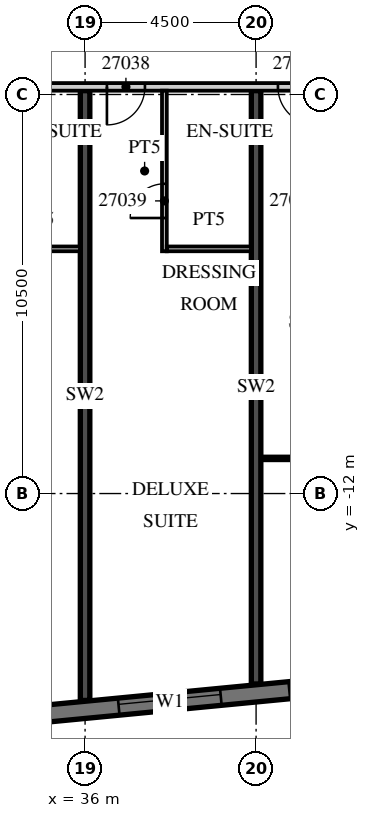
"""IFC4 building model, lengths in metres.
Left out: names, types, materials, properties, quantities, classifications, styles, units other than length and angle.
Written with IfcOpenShell. Run it as: python <this file> out.ifc"""

import sys

from ifc_helpers import new_model, si_unit, direction, frame, frame_2d, origin, place, context, subcontext, project, spatial, rectangle, extrude, element, fill, save


model = new_model("IFC4")
c1 = context("Model", 3, precision=1e-05, world=origin(), true_north=direction((0.0, 1.0)))
c2 = subcontext(c1, "Body", "Model", "MODEL_VIEW")
j1 = project(units=[si_unit("LENGTHUNIT", "METRE"), si_unit("PLANEANGLEUNIT", "RADIAN")], contexts=[c1])
p1 = place(None, origin())
s1 = spatial("IfcSite", under=j1, at=p1, CompositionType="ELEMENT")
p2 = place(p1, origin())
s2 = spatial("IfcBuilding", under=s1, at=p2, CompositionType="ELEMENT")
p3 = place(p2, frame((0.0, 0.0, 124.0)))
s3 = spatial("IfcBuildingStorey", under=s2, at=p3, CompositionType="ELEMENT", Elevation=124.0)
p4 = place(p3, frame((36.0, -17.444, 0.0), z_axis=(0.0, 0.0, 1.0), x_axis=(0.0, 1.0, 0.0)))
e1 = element("IfcWall", 1, at=p4, inside=s3, PredefinedType="SHEAR", context=c2, shape_type="SweptSolid", body=[
    extrude(rectangle(XDim=16.044, YDim=0.25, at=frame_2d((8.022, 0.0))), origin(), (0.0, 0.0, 1.0), 3.3),
])
p5 = place(p3, frame((40.5, -17.011, 0.0), z_axis=(0.0, 0.0, 1.0), x_axis=(0.0, 1.0, 0.0)))
e2 = element("IfcWall", 2, at=p5, inside=s3, PredefinedType="SHEAR", context=c2, shape_type="SweptSolid", body=[
    extrude(rectangle(XDim=15.611, YDim=0.25, at=frame_2d((7.805, 0.0))), origin(), (0.0, 0.0, 1.0), 3.3),
])
p6 = place(p3, frame((-13.521, -22.46, 0.0), z_axis=(0.0, 0.0, 1.0), x_axis=(0.995396096335, 0.095846812164, 0.0)))
e3 = element("IfcWall", 3, at=p6, inside=s3, PredefinedType="SOLIDWALL", context=c2, shape_type="SweptSolid", body=[
    extrude(rectangle(XDim=59.151, YDim=0.45, at=frame_2d((29.575, 0.0))), origin(), (0.0, 0.0, 1.0), 3.02),
])
p7 = place(p6, frame((0.91, 0.0, 0.45)))
e4 = element("IfcOpeningElement", 4, at=p7, cuts=e3, PredefinedType="OPENING", context=c2, shape_type="SweptSolid", body=[
    extrude(rectangle(XDim=2.7, YDim=2.25, at=frame_2d((1.35, 1.125))), frame((0.0, 0.235, 0.0), z_axis=(0.0, -1.0, 0.0), x_axis=(1.0, 0.0, 0.0)), (0.0, 0.0, 1.0), 0.47),
])
p8 = place(p6, frame((5.431, 0.0, 0.45)))
e5 = element("IfcOpeningElement", 5, at=p8, cuts=e3, PredefinedType="OPENING", context=c2, shape_type="SweptSolid", body=[
    extrude(rectangle(XDim=2.7, YDim=2.25, at=frame_2d((1.35, 1.125))), frame((0.0, 0.235, 0.0), z_axis=(0.0, -1.0, 0.0), x_axis=(1.0, 0.0, 0.0)), (0.0, 0.0, 1.0), 0.47),
])
p9 = place(p6, frame((9.952, 0.0, 0.45)))
e6 = element("IfcOpeningElement", 6, at=p9, cuts=e3, PredefinedType="OPENING", context=c2, shape_type="SweptSolid", body=[
    extrude(rectangle(XDim=2.7, YDim=2.25, at=frame_2d((1.35, 1.125))), frame((0.0, 0.235, 0.0), z_axis=(0.0, -1.0, 0.0), x_axis=(1.0, 0.0, 0.0)), (0.0, 0.0, 1.0), 0.47),
])
p10 = place(p6, frame((14.473, 0.0, 0.45)))
e7 = element("IfcOpeningElement", 7, at=p10, cuts=e3, PredefinedType="OPENING", context=c2, shape_type="SweptSolid", body=[
    extrude(rectangle(XDim=2.7, YDim=2.25, at=frame_2d((1.35, 1.125))), frame((0.0, 0.235, 0.0), z_axis=(0.0, -1.0, 0.0), x_axis=(1.0, 0.0, 0.0)), (0.0, 0.0, 1.0), 0.47),
])
p11 = place(p6, frame((18.994, 0.0, 0.45)))
e8 = element("IfcOpeningElement", 8, at=p11, cuts=e3, PredefinedType="OPENING", context=c2, shape_type="SweptSolid", body=[
    extrude(rectangle(XDim=2.7, YDim=2.25, at=frame_2d((1.35, 1.125))), frame((0.0, 0.235, 0.0), z_axis=(0.0, -1.0, 0.0), x_axis=(1.0, 0.0, 0.0)), (0.0, 0.0, 1.0), 0.47),
])
p12 = place(p6, frame((23.514, 0.0, 0.45)))
e9 = element("IfcOpeningElement", 9, at=p12, cuts=e3, PredefinedType="OPENING", context=c2, shape_type="SweptSolid", body=[
    extrude(rectangle(XDim=2.7, YDim=2.25, at=frame_2d((1.35, 1.125))), frame((0.0, 0.235, 0.0), z_axis=(0.0, -1.0, 0.0), x_axis=(1.0, 0.0, 0.0)), (0.0, 0.0, 1.0), 0.47),
])
p13 = place(p6, frame((28.035, 0.0, 0.45)))
e10 = element("IfcOpeningElement", 10, at=p13, cuts=e3, PredefinedType="OPENING", context=c2, shape_type="SweptSolid", body=[
    extrude(rectangle(XDim=2.7, YDim=2.25, at=frame_2d((1.35, 1.125))), frame((0.0, 0.235, 0.0), z_axis=(0.0, -1.0, 0.0), x_axis=(1.0, 0.0, 0.0)), (0.0, 0.0, 1.0), 0.47),
])
p14 = place(p6, frame((32.556, 0.0, 0.45)))
e11 = element("IfcOpeningElement", 11, at=p14, cuts=e3, PredefinedType="OPENING", context=c2, shape_type="SweptSolid", body=[
    extrude(rectangle(XDim=2.7, YDim=2.25, at=frame_2d((1.35, 1.125))), frame((0.0, 0.235, 0.0), z_axis=(0.0, -1.0, 0.0), x_axis=(1.0, 0.0, 0.0)), (0.0, 0.0, 1.0), 0.47),
])
p15 = place(p6, frame((37.077, 0.0, 0.45)))
e12 = element("IfcOpeningElement", 12, at=p15, cuts=e3, PredefinedType="OPENING", context=c2, shape_type="SweptSolid", body=[
    extrude(rectangle(XDim=2.7, YDim=2.25, at=frame_2d((1.35, 1.125))), frame((0.0, 0.235, 0.0), z_axis=(0.0, -1.0, 0.0), x_axis=(1.0, 0.0, 0.0)), (0.0, 0.0, 1.0), 0.47),
])
p16 = place(p6, frame((41.598, 0.0, 0.45)))
e13 = element("IfcOpeningElement", 13, at=p16, cuts=e3, PredefinedType="OPENING", context=c2, shape_type="SweptSolid", body=[
    extrude(rectangle(XDim=2.7, YDim=2.25, at=frame_2d((1.35, 1.125))), frame((0.0, 0.235, 0.0), z_axis=(0.0, -1.0, 0.0), x_axis=(1.0, 0.0, 0.0)), (0.0, 0.0, 1.0), 0.47),
])
p17 = place(p6, frame((46.118, 0.0, 0.45)))
e14 = element("IfcOpeningElement", 14, at=p17, cuts=e3, PredefinedType="OPENING", context=c2, shape_type="SweptSolid", body=[
    extrude(rectangle(XDim=2.7, YDim=2.25, at=frame_2d((1.35, 1.125))), frame((0.0, 0.235, 0.0), z_axis=(0.0, -1.0, 0.0), x_axis=(1.0, 0.0, 0.0)), (0.0, 0.0, 1.0), 0.47),
])
p18 = place(p6, frame((50.639, 0.0, 0.45)))
e15 = element("IfcOpeningElement", 15, at=p18, cuts=e3, PredefinedType="OPENING", context=c2, shape_type="SweptSolid", body=[
    extrude(rectangle(XDim=2.7, YDim=2.25, at=frame_2d((1.35, 1.125))), frame((0.0, 0.235, 0.0), z_axis=(0.0, -1.0, 0.0), x_axis=(1.0, 0.0, 0.0)), (0.0, 0.0, 1.0), 0.47),
])
p19 = place(p6, frame((55.15, 0.0, 0.45)))
e16 = element("IfcOpeningElement", 16, at=p19, cuts=e3, PredefinedType="OPENING", context=c2, shape_type="SweptSolid", body=[
    extrude(rectangle(XDim=2.7, YDim=2.25, at=frame_2d((1.35, 1.125))), frame((0.0, 0.235, 0.0), z_axis=(0.0, -1.0, 0.0), x_axis=(1.0, 0.0, 0.0)), (0.0, 0.0, 1.0), 0.47),
])
p20 = place(p3, frame((-13.5, -1.3, 0.0), z_axis=(0.0, 0.0, 1.0), x_axis=(1.0, 0.0, 0.0)))
e17 = element("IfcWall", 17, at=p20, inside=s3, PredefinedType="PARTITIONING", context=c2, shape_type="SweptSolid", body=[
    extrude(rectangle(XDim=60.932, YDim=0.2, at=frame_2d((30.466, 0.0))), origin(), (0.0, 0.0, 1.0), 3.02),
])
p21 = place(p20, frame((2.925, 0.0, 0.0)))
e18 = element("IfcOpeningElement", 18, at=p21, cuts=e17, PredefinedType="OPENING", context=c2, shape_type="SweptSolid", body=[
    extrude(rectangle(XDim=1.0, YDim=2.1, at=frame_2d((0.5, 1.05))), frame((0.0, 0.11, 0.0), z_axis=(0.0, -1.0, 0.0), x_axis=(1.0, 0.0, 0.0)), (0.0, 0.0, 1.0), 0.22),
])
p22 = place(p20, frame((9.863, 0.0, 0.0)))
e19 = element("IfcOpeningElement", 19, at=p22, cuts=e17, PredefinedType="OPENING", context=c2, shape_type="SweptSolid", body=[
    extrude(rectangle(XDim=1.2, YDim=2.1, at=frame_2d((0.6, 1.05))), frame((0.0, 0.11, 0.0), z_axis=(0.0, -1.0, 0.0), x_axis=(1.0, 0.0, 0.0)), (0.0, 0.0, 1.0), 0.22),
])
p23 = place(p20, frame((15.938, 0.0, 0.0)))
e20 = element("IfcOpeningElement", 20, at=p23, cuts=e17, PredefinedType="OPENING", context=c2, shape_type="SweptSolid", body=[
    extrude(rectangle(XDim=1.2, YDim=2.1, at=frame_2d((0.6, 1.05))), frame((0.0, 0.11, 0.0), z_axis=(0.0, -1.0, 0.0), x_axis=(1.0, 0.0, 0.0)), (0.0, 0.0, 1.0), 0.22),
])
p24 = place(p20, frame((27.862, 0.0, 0.0)))
e21 = element("IfcOpeningElement", 21, at=p24, cuts=e17, PredefinedType="OPENING", context=c2, shape_type="SweptSolid", body=[
    extrude(rectangle(XDim=1.2, YDim=2.1, at=frame_2d((0.6, 1.05))), frame((0.0, 0.11, 0.0), z_axis=(0.0, -1.0, 0.0), x_axis=(1.0, 0.0, 0.0)), (0.0, 0.0, 1.0), 0.22),
])
p25 = place(p20, frame((34.45, 0.0, 0.0)))
e22 = element("IfcOpeningElement", 22, at=p25, cuts=e17, PredefinedType="OPENING", context=c2, shape_type="SweptSolid", body=[
    extrude(rectangle(XDim=1.0, YDim=2.1, at=frame_2d((0.5, 1.05))), frame((0.0, 0.11, 0.0), z_axis=(0.0, -1.0, 0.0), x_axis=(1.0, 0.0, 0.0)), (0.0, 0.0, 1.0), 0.22),
])
p26 = place(p20, frame((36.55, 0.0, 0.0)))
e23 = element("IfcOpeningElement", 23, at=p26, cuts=e17, PredefinedType="OPENING", context=c2, shape_type="SweptSolid", body=[
    extrude(rectangle(XDim=1.0, YDim=2.1, at=frame_2d((0.5, 1.05))), frame((0.0, 0.11, 0.0), z_axis=(0.0, -1.0, 0.0), x_axis=(1.0, 0.0, 0.0)), (0.0, 0.0, 1.0), 0.22),
])
p27 = place(p20, frame((41.075, 0.0, 0.0)))
e24 = element("IfcOpeningElement", 24, at=p27, cuts=e17, PredefinedType="OPENING", context=c2, shape_type="SweptSolid", body=[
    extrude(rectangle(XDim=1.0, YDim=2.1, at=frame_2d((0.5, 1.05))), frame((0.0, 0.11, 0.0), z_axis=(0.0, -1.0, 0.0), x_axis=(1.0, 0.0, 0.0)), (0.0, 0.0, 1.0), 0.22),
])
p28 = place(p20, frame((45.55, 0.0, 0.0)))
e25 = element("IfcOpeningElement", 25, at=p28, cuts=e17, PredefinedType="OPENING", context=c2, shape_type="SweptSolid", body=[
    extrude(rectangle(XDim=1.0, YDim=2.1, at=frame_2d((0.5, 1.05))), frame((0.0, 0.11, 0.0), z_axis=(0.0, -1.0, 0.0), x_axis=(1.0, 0.0, 0.0)), (0.0, 0.0, 1.0), 0.22),
])
p29 = place(p20, frame((50.075, 0.0, 0.0)))
e26 = element("IfcOpeningElement", 26, at=p29, cuts=e17, PredefinedType="OPENING", context=c2, shape_type="SweptSolid", body=[
    extrude(rectangle(XDim=1.0, YDim=2.1, at=frame_2d((0.5, 1.05))), frame((0.0, 0.11, 0.0), z_axis=(0.0, -1.0, 0.0), x_axis=(1.0, 0.0, 0.0)), (0.0, 0.0, 1.0), 0.22),
])
p30 = place(p20, frame((54.575, 0.0, 0.0)))
e27 = element("IfcOpeningElement", 27, at=p30, cuts=e17, PredefinedType="OPENING", context=c2, shape_type="SweptSolid", body=[
    extrude(rectangle(XDim=1.0, YDim=2.1, at=frame_2d((0.5, 1.05))), frame((0.0, 0.11, 0.0), z_axis=(0.0, -1.0, 0.0), x_axis=(1.0, 0.0, 0.0)), (0.0, 0.0, 1.0), 0.22),
])
p31 = place(p20, frame((59.882, 0.0, 0.0)))
e28 = element("IfcOpeningElement", 28, at=p31, cuts=e17, PredefinedType="OPENING", context=c2, shape_type="SweptSolid", body=[
    extrude(rectangle(XDim=0.9, YDim=2.1, at=frame_2d((0.45, 1.05))), frame((0.0, 0.11, 0.0), z_axis=(0.0, -1.0, 0.0), x_axis=(1.0, 0.0, 0.0)), (0.0, 0.0, 1.0), 0.22),
])
p32 = place(p3, frame((33.625, -5.562, 0.0), z_axis=(0.0, 0.0, 1.0), x_axis=(1.0, 0.0, 0.0)))
e29 = element("IfcWall", 29, at=p32, inside=s3, PredefinedType="PARTITIONING", context=c2, shape_type="SweptSolid", body=[
    extrude(rectangle(XDim=2.25, YDim=0.125, at=frame_2d((1.125, 0.0))), origin(), (0.0, 0.0, 1.0), 3.02),
])
p33 = place(p3, frame((38.087, -5.625, 0.0), z_axis=(0.0, 0.0, 1.0), x_axis=(0.0, 1.0, 0.0)))
e30 = element("IfcWall", 30, at=p33, inside=s3, PredefinedType="PARTITIONING", context=c2, shape_type="SweptSolid", body=[
    extrude(rectangle(XDim=4.225, YDim=0.125, at=frame_2d((2.113, 0.0))), origin(), (0.0, 0.0, 1.0), 3.02),
])
p34 = place(p33, frame((0.875, 0.0, 0.0)))
e31 = element("IfcOpeningElement", 31, at=p34, cuts=e30, PredefinedType="OPENING", context=c2, shape_type="SweptSolid", body=[
    extrude(rectangle(XDim=0.9, YDim=2.1, at=frame_2d((0.45, 1.05))), frame((0.0, 0.073, 0.0), z_axis=(0.0, -1.0, 0.0), x_axis=(1.0, 0.0, 0.0)), (0.0, 0.0, 1.0), 0.145),
])
p35 = place(p3, frame((38.15, -5.562, 0.0), z_axis=(0.0, 0.0, 1.0), x_axis=(1.0, 0.0, 0.0)))
e32 = element("IfcWall", 32, at=p35, inside=s3, PredefinedType="PARTITIONING", context=c2, shape_type="SweptSolid", body=[
    extrude(rectangle(XDim=2.225, YDim=0.125, at=frame_2d((1.113, 0.0))), origin(), (0.0, 0.0, 1.0), 3.02),
])
p36 = place(p3, frame((40.625, -11.075, 0.0), z_axis=(0.0, 0.0, 1.0), x_axis=(1.0, 0.0, 0.0)))
e33 = element("IfcWall", 33, at=p36, inside=s3, PredefinedType="PARTITIONING", context=c2, shape_type="SweptSolid", body=[
    extrude(rectangle(XDim=4.275, YDim=0.1, at=frame_2d((2.137, 0.0))), origin(), (0.0, 0.0, 1.0), 3.02),
])
p37 = place(p36, frame((1.988, 0.0, 0.0)))
e34 = element("IfcOpeningElement", 34, at=p37, cuts=e33, PredefinedType="OPENING", context=c2, shape_type="SweptSolid", body=[
    extrude(rectangle(XDim=1.5, YDim=2.1, at=frame_2d((0.75, 1.05))), frame((0.0, 0.06, 0.0), z_axis=(0.0, -1.0, 0.0), x_axis=(1.0, 0.0, 0.0)), (0.0, 0.0, 1.0), 0.12),
])
p38 = place(p18, origin())
e35 = element("IfcWindow", 35, at=p38, inside=s3, PartitioningType="SINGLE_PANEL", PredefinedType="WINDOW", context=c2, shape_type="SweptSolid", body=[
    extrude(rectangle(XDim=2.7, YDim=2.25, at=frame_2d((1.35, 1.125))), frame((0.0, 0.09, 0.0), z_axis=(0.0, -1.0, 0.0), x_axis=(1.0, 0.0, 0.0)), (0.0, 0.0, 1.0), 0.06),
])
fill(e15, e35)
p39 = place(p19, origin())
e36 = element("IfcWindow", 36, at=p39, inside=s3, PartitioningType="SINGLE_PANEL", PredefinedType="WINDOW", context=c2, shape_type="SweptSolid", body=[
    extrude(rectangle(XDim=2.7, YDim=2.25, at=frame_2d((1.35, 1.125))), frame((0.0, 0.09, 0.0), z_axis=(0.0, -1.0, 0.0), x_axis=(1.0, 0.0, 0.0)), (0.0, 0.0, 1.0), 0.06),
])
fill(e16, e36)
p40 = place(p29, origin())
e37 = element("IfcDoor", 37, at=p40, inside=s3, OperationType="SINGLE_SWING_LEFT", PredefinedType="DOOR", context=c2, shape_type="SweptSolid", body=[
    extrude(rectangle(XDim=1.0, YDim=2.1, at=frame_2d((0.5, 1.05))), frame((0.0, 0.025, 0.0), z_axis=(0.0, -1.0, 0.0), x_axis=(1.0, 0.0, 0.0)), (0.0, 0.0, 1.0), 0.05),
])
fill(e26, e37)
p41 = place(p34, origin())
e38 = element("IfcDoor", 38, at=p41, inside=s3, OperationType="SINGLE_SWING_LEFT", PredefinedType="DOOR", context=c2, shape_type="SweptSolid", body=[
    extrude(rectangle(XDim=0.9, YDim=2.1, at=frame_2d((0.45, 1.05))), frame((0.0, 0.025, 0.0), z_axis=(0.0, -1.0, 0.0), x_axis=(1.0, 0.0, 0.0)), (0.0, 0.0, 1.0), 0.05),
])
fill(e31, e38)
p42 = place(p30, origin())
e39 = element("IfcDoor", 39, at=p42, inside=s3, OperationType="SINGLE_SWING_RIGHT", PredefinedType="DOOR", context=c2, shape_type="SweptSolid", body=[
    extrude(rectangle(XDim=1.0, YDim=2.1, at=frame_2d((0.5, 1.05))), frame((0.0, 0.025, 0.0), z_axis=(0.0, -1.0, 0.0), x_axis=(1.0, 0.0, 0.0)), (0.0, 0.0, 1.0), 0.05),
])
fill(e27, e39)
save(model, sys.argv[1])
